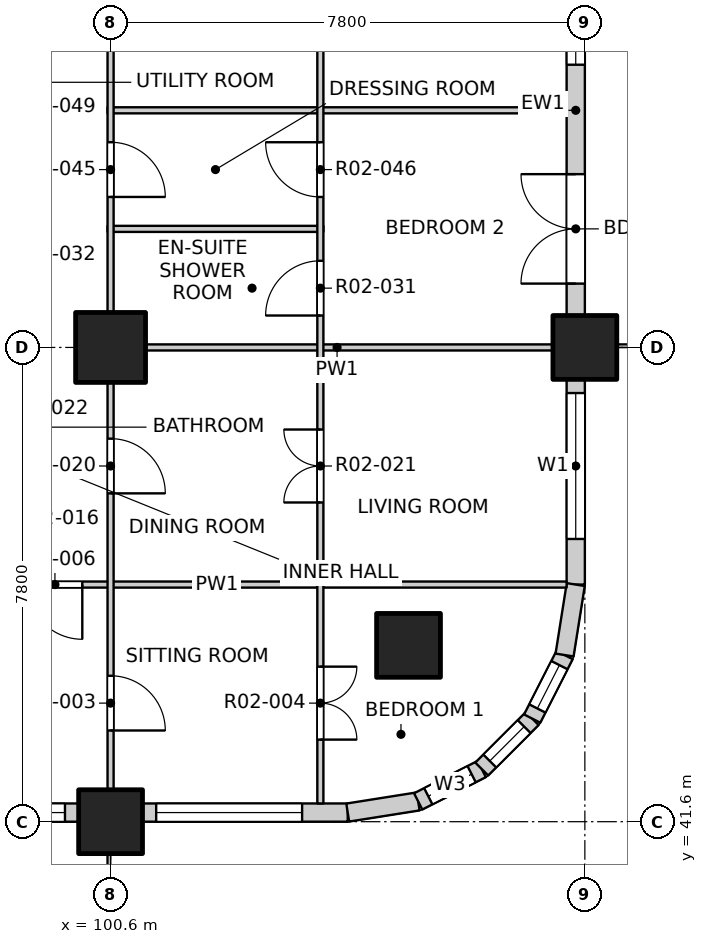
"""IFC4 building model, lengths in metres.
Left out: names, types, materials, properties, quantities, classifications, styles, units other than length and angle.
Written with IfcOpenShell. Run it as: python <this file> out.ifc"""

import sys

from ifc_helpers import new_model, si_unit, direction, frame, frame_2d, origin, origin_2d, place, context, subcontext, project, spatial, rectangle, extrude, element, fill, save


model = new_model("IFC4")
c1 = context("Model", 3, precision=1e-05, world=origin(), true_north=direction((0.0, 1.0)))
c2 = subcontext(c1, "Body", "Model", "MODEL_VIEW")
j1 = project(units=[si_unit("LENGTHUNIT", "METRE"), si_unit("PLANEANGLEUNIT", "RADIAN")], contexts=[c1])
p1 = place(None, origin())
s1 = spatial("IfcSite", under=j1, at=p1, CompositionType="ELEMENT")
p2 = place(p1, origin())
s2 = spatial("IfcBuilding", under=s1, at=p2, CompositionType="ELEMENT")
p3 = place(p2, frame((0.0, 0.0, 29.7)))
s3 = spatial("IfcBuildingStorey", under=s2, at=p3, CompositionType="ELEMENT", Elevation=29.7)
for number, where, z_axis, x_axis in (
    (1, (105.5, 44.5, -0.25), (0.0, 0.0, 1.0), (1.0, 0.0, 0.0)),
    (2, (108.4, 49.4, -0.25), (0.0, 0.0, 1.0), (1.0, 0.0, 0.0)),
    (3, (100.6, 41.6, -0.25), (0.0, 0.0, 1.0), (1.0, 0.0, 0.0)),
):
    element("IfcColumn", number, at=place(p3, frame(where, z_axis=z_axis, x_axis=x_axis)), inside=s3, PredefinedType="COLUMN", context=c2, shape_type="SweptSolid", body=[
        extrude(rectangle(XDim=1.05, YDim=1.05, at=origin_2d()), origin(), (0.0, 0.0, 1.0), 3.4),
    ])
p4 = place(p3, frame((100.6, 49.4, -0.25), z_axis=(0.0, 0.0, 1.0), x_axis=(1.0, 0.0, 0.0)))
e4 = element("IfcColumn", 4, at=p4, inside=s3, PredefinedType="COLUMN", context=c2, shape_type="SweptSolid", body=[
    extrude(rectangle(XDim=1.15, YDim=1.15, at=origin_2d()), origin(), (0.0, 0.0, 1.0), 3.4),
])
p5 = place(p3, frame((93.325, 41.75, 0.0), z_axis=(0.0, 0.0, 1.0), x_axis=(1.0, 0.0, 0.0)))
e5 = element("IfcWall", 5, at=p5, inside=s3, PredefinedType="SOLIDWALL", context=c2, shape_type="SweptSolid", body=[
    extrude(rectangle(XDim=6.75, YDim=0.3, at=frame_2d((3.375, 0.0))), origin(), (0.0, 0.0, 1.0), 2.7),
])
p6 = place(p5, frame((0.525, 0.0, 0.0)))
e6 = element("IfcOpeningElement", 6, at=p6, cuts=e5, PredefinedType="OPENING", context=c2, shape_type="SweptSolid", body=[
    extrude(rectangle(XDim=1.8, YDim=2.4, at=frame_2d((0.9, 1.2))), frame((0.0, 0.16, 0.0), z_axis=(0.0, -1.0, 0.0), x_axis=(1.0, 0.0, 0.0)), (0.0, 0.0, 1.0), 0.32),
])
p7 = place(p5, frame((4.125, 0.0, 0.9)))
e7 = element("IfcOpeningElement", 7, at=p7, cuts=e5, PredefinedType="OPENING", context=c2, shape_type="SweptSolid", body=[
    extrude(rectangle(XDim=2.4, YDim=1.8, at=frame_2d((1.2, 0.9))), frame((0.0, 0.16, 0.0), z_axis=(0.0, -1.0, 0.0), x_axis=(1.0, 0.0, 0.0)), (0.0, 0.0, 1.0), 0.32),
])
p8 = place(p3, frame((101.125, 41.75, 0.0), z_axis=(0.0, 0.0, 1.0), x_axis=(1.0, 0.0, 0.0)))
e8 = element("IfcWall", 8, at=p8, inside=s3, PredefinedType="SOLIDWALL", context=c2, shape_type="SweptSolid", body=[
    extrude(rectangle(XDim=3.375, YDim=0.3, at=frame_2d((1.688, 0.0))), origin(), (0.0, 0.0, 1.0), 2.7),
])
p9 = place(p8, frame((0.225, 0.0, 0.9)))
e9 = element("IfcOpeningElement", 9, at=p9, cuts=e8, PredefinedType="OPENING", context=c2, shape_type="SweptSolid", body=[
    extrude(rectangle(XDim=2.4, YDim=1.8, at=frame_2d((1.2, 0.9))), frame((0.0, 0.16, 0.0), z_axis=(0.0, -1.0, 0.0), x_axis=(1.0, 0.0, 0.0)), (0.0, 0.0, 1.0), 0.32),
])
p10 = place(p3, frame((108.25, 45.5, 0.0), z_axis=(0.0, 0.0, 1.0), x_axis=(0.0, 1.0, 0.0)))
e10 = element("IfcWall", 10, at=p10, inside=s3, PredefinedType="SOLIDWALL", context=c2, shape_type="SweptSolid", body=[
    extrude(rectangle(XDim=3.375, YDim=0.3, at=frame_2d((1.688, 0.0))), origin(), (0.0, 0.0, 1.0), 2.7),
])
p11 = place(p10, frame((0.75, 0.0, 0.9)))
e11 = element("IfcOpeningElement", 11, at=p11, cuts=e10, PredefinedType="OPENING", context=c2, shape_type="SweptSolid", body=[
    extrude(rectangle(XDim=2.4, YDim=1.8, at=frame_2d((1.2, 0.9))), frame((0.0, 0.16, 0.0), z_axis=(0.0, -1.0, 0.0), x_axis=(1.0, 0.0, 0.0)), (0.0, 0.0, 1.0), 0.32),
])
p12 = place(p3, frame((108.25, 49.925, 0.0), z_axis=(0.0, 0.0, 1.0), x_axis=(0.0, 1.0, 0.0)))
e12 = element("IfcWall", 12, at=p12, inside=s3, PredefinedType="SOLIDWALL", context=c2, shape_type="SweptSolid", body=[
    extrude(rectangle(XDim=6.75, YDim=0.3, at=frame_2d((3.375, 0.0))), origin(), (0.0, 0.0, 1.0), 2.7),
])
p13 = place(p12, frame((0.525, 0.0, 0.0)))
e13 = element("IfcOpeningElement", 13, at=p13, cuts=e12, PredefinedType="OPENING", context=c2, shape_type="SweptSolid", body=[
    extrude(rectangle(XDim=1.8, YDim=2.4, at=frame_2d((0.9, 1.2))), frame((0.0, 0.16, 0.0), z_axis=(0.0, -1.0, 0.0), x_axis=(1.0, 0.0, 0.0)), (0.0, 0.0, 1.0), 0.32),
])
p14 = place(p12, frame((4.125, 0.0, 0.9)))
e14 = element("IfcOpeningElement", 14, at=p14, cuts=e12, PredefinedType="OPENING", context=c2, shape_type="SweptSolid", body=[
    extrude(rectangle(XDim=2.4, YDim=1.8, at=frame_2d((1.2, 0.9))), frame((0.0, 0.16, 0.0), z_axis=(0.0, -1.0, 0.0), x_axis=(1.0, 0.0, 0.0)), (0.0, 0.0, 1.0), 0.32),
])
p15 = place(p3, frame((104.5, 41.75, 0.0), z_axis=(0.0, 0.0, 1.0), x_axis=(0.987678452879, 0.156496880861, 0.0)))
e15 = element("IfcWall", 15, at=p15, inside=s3, PredefinedType="SOLIDWALL", context=c2, shape_type="SweptSolid", body=[
    extrude(rectangle(XDim=1.173, YDim=0.3, at=frame_2d((0.586, 0.0))), origin(), (0.0, 0.0, 1.0), 2.7),
])
p16 = place(p3, frame((105.659, 41.934, 0.0), z_axis=(0.0, 0.0, 1.0), x_axis=(0.890988677504, 0.454025524128, 0.0)))
e16 = element("IfcWall", 16, at=p16, inside=s3, PredefinedType="SOLIDWALL", context=c2, shape_type="SweptSolid", body=[
    extrude(rectangle(XDim=1.173, YDim=0.3, at=frame_2d((0.587, 0.0))), origin(), (0.0, 0.0, 1.0), 2.7),
])
p17 = place(p16, frame((0.187, 0.0, 0.9)))
e17 = element("IfcOpeningElement", 17, at=p17, cuts=e16, PredefinedType="OPENING", context=c2, shape_type="SweptSolid", body=[
    extrude(rectangle(XDim=0.8, YDim=1.2, at=frame_2d((0.4, 0.6))), frame((0.0, 0.16, 0.0), z_axis=(0.0, -1.0, 0.0), x_axis=(1.0, 0.0, 0.0)), (0.0, 0.0, 1.0), 0.32),
])
p18 = place(p3, frame((106.704, 42.466, 0.0), z_axis=(0.0, 0.0, 1.0), x_axis=(0.707106781187, 0.707106781187, 0.0)))
e18 = element("IfcWall", 18, at=p18, inside=s3, PredefinedType="SOLIDWALL", context=c2, shape_type="SweptSolid", body=[
    extrude(rectangle(XDim=1.173, YDim=0.3, at=frame_2d((0.586, 0.0))), origin(), (0.0, 0.0, 1.0), 2.7),
])
p19 = place(p18, frame((0.187, 0.0, 0.9)))
e19 = element("IfcOpeningElement", 19, at=p19, cuts=e18, PredefinedType="OPENING", context=c2, shape_type="SweptSolid", body=[
    extrude(rectangle(XDim=0.8, YDim=1.2, at=frame_2d((0.4, 0.6))), frame((0.0, 0.16, 0.0), z_axis=(0.0, -1.0, 0.0), x_axis=(1.0, 0.0, 0.0)), (0.0, 0.0, 1.0), 0.32),
])
p20 = place(p3, frame((107.534, 43.296, 0.0), z_axis=(0.0, 0.0, 1.0), x_axis=(0.454025524128, 0.890988677504, 0.0)))
e20 = element("IfcWall", 20, at=p20, inside=s3, PredefinedType="SOLIDWALL", context=c2, shape_type="SweptSolid", body=[
    extrude(rectangle(XDim=1.173, YDim=0.3, at=frame_2d((0.587, 0.0))), origin(), (0.0, 0.0, 1.0), 2.7),
])
p21 = place(p20, frame((0.187, 0.0, 0.9)))
e21 = element("IfcOpeningElement", 21, at=p21, cuts=e20, PredefinedType="OPENING", context=c2, shape_type="SweptSolid", body=[
    extrude(rectangle(XDim=0.8, YDim=1.2, at=frame_2d((0.4, 0.6))), frame((0.0, 0.16, 0.0), z_axis=(0.0, -1.0, 0.0), x_axis=(1.0, 0.0, 0.0)), (0.0, 0.0, 1.0), 0.32),
])
p22 = place(p3, frame((108.066, 44.341, 0.0), z_axis=(0.0, 0.0, 1.0), x_axis=(0.156496880861, 0.987678452879, 0.0)))
e22 = element("IfcWall", 22, at=p22, inside=s3, PredefinedType="SOLIDWALL", context=c2, shape_type="SweptSolid", body=[
    extrude(rectangle(XDim=1.173, YDim=0.3, at=frame_2d((0.586, 0.0))), origin(), (0.0, 0.0, 1.0), 2.7),
])
p23 = place(p3, frame((96.6, 45.5, 0.0), z_axis=(0.0, 0.0, 1.0), x_axis=(1.0, 0.0, 0.0)))
e23 = element("IfcWall", 23, at=p23, inside=s3, PredefinedType="PARTITIONING", context=c2, shape_type="SweptSolid", body=[
    extrude(rectangle(XDim=11.5, YDim=0.1, at=frame_2d((5.75, 0.0))), origin(), (0.0, 0.0, 1.0), 3.15),
])
p24 = place(p23, frame((2.635, 0.0, 0.0)))
e24 = element("IfcOpeningElement", 24, at=p24, cuts=e23, PredefinedType="OPENING", context=c2, shape_type="SweptSolid", body=[
    extrude(rectangle(XDim=0.9, YDim=2.1, at=frame_2d((0.45, 1.05))), frame((0.0, 0.06, 0.0), z_axis=(0.0, -1.0, 0.0), x_axis=(1.0, 0.0, 0.0)), (0.0, 0.0, 1.0), 0.12),
])
p25 = place(p3, frame((100.55, 49.4, 0.0), z_axis=(0.0, 0.0, 1.0), x_axis=(1.0, 0.0, 0.0)))
e25 = element("IfcWall", 25, at=p25, inside=s3, PredefinedType="PARTITIONING", context=c2, shape_type="SweptSolid", body=[
    extrude(rectangle(XDim=7.55, YDim=0.1, at=frame_2d((3.775, 0.0))), origin(), (0.0, 0.0, 1.0), 2.55),
])
p26 = place(p3, frame((100.55, 51.35, 0.0), z_axis=(0.0, 0.0, 1.0), x_axis=(1.0, 0.0, 0.0)))
e26 = element("IfcWall", 26, at=p26, inside=s3, PredefinedType="PARTITIONING", context=c2, shape_type="SweptSolid", body=[
    extrude(rectangle(XDim=3.55, YDim=0.1, at=frame_2d((1.775, 0.0))), origin(), (0.0, 0.0, 1.0), 3.15),
])
p27 = place(p3, frame((100.55, 53.3, 0.0), z_axis=(0.0, 0.0, 1.0), x_axis=(1.0, 0.0, 0.0)))
e27 = element("IfcWall", 27, at=p27, inside=s3, PredefinedType="PARTITIONING", context=c2, shape_type="SweptSolid", body=[
    extrude(rectangle(XDim=7.55, YDim=0.1, at=frame_2d((3.775, 0.0))), origin(), (0.0, 0.0, 1.0), 3.15),
])
p28 = place(p3, frame((100.6, 41.9, 0.0), z_axis=(0.0, 0.0, 1.0), x_axis=(0.0, 1.0, 0.0)))
e28 = element("IfcWall", 28, at=p28, inside=s3, PredefinedType="PARTITIONING", context=c2, shape_type="SweptSolid", body=[
    extrude(rectangle(XDim=7.5, YDim=0.1, at=frame_2d((3.75, 0.0))), origin(), (0.0, 0.0, 1.0), 2.55),
])
p29 = place(p28, frame((1.2, 0.0, 0.0)))
e29 = element("IfcOpeningElement", 29, at=p29, cuts=e28, PredefinedType="OPENING", context=c2, shape_type="SweptSolid", body=[
    extrude(rectangle(XDim=0.9, YDim=2.1, at=frame_2d((0.45, 1.05))), frame((0.0, 0.06, 0.0), z_axis=(0.0, -1.0, 0.0), x_axis=(1.0, 0.0, 0.0)), (0.0, 0.0, 1.0), 0.12),
])
p30 = place(p28, frame((5.1, 0.0, 0.0)))
e30 = element("IfcOpeningElement", 30, at=p30, cuts=e28, PredefinedType="OPENING", context=c2, shape_type="SweptSolid", body=[
    extrude(rectangle(XDim=0.9, YDim=2.1, at=frame_2d((0.45, 1.05))), frame((0.0, 0.06, 0.0), z_axis=(0.0, -1.0, 0.0), x_axis=(1.0, 0.0, 0.0)), (0.0, 0.0, 1.0), 0.12),
])
p31 = place(p3, frame((100.6, 49.4, 0.0), z_axis=(0.0, 0.0, 1.0), x_axis=(0.0, 1.0, 0.0)))
e31 = element("IfcWall", 31, at=p31, inside=s3, PredefinedType="PARTITIONING", context=c2, shape_type="SweptSolid", body=[
    extrude(rectangle(XDim=31.2, YDim=0.1, at=frame_2d((15.6, 0.0))), origin(), (0.0, 0.0, 1.0), 3.15),
])
p32 = place(p31, frame((2.475, 0.0, 0.0)))
e32 = element("IfcOpeningElement", 32, at=p32, cuts=e31, PredefinedType="OPENING", context=c2, shape_type="SweptSolid", body=[
    extrude(rectangle(XDim=0.9, YDim=2.1, at=frame_2d((0.45, 1.05))), frame((0.0, 0.06, 0.0), z_axis=(0.0, -1.0, 0.0), x_axis=(1.0, 0.0, 0.0)), (0.0, 0.0, 1.0), 0.12),
])
p33 = place(p31, frame((5.4, 0.0, 0.0)))
e33 = element("IfcOpeningElement", 33, at=p33, cuts=e31, PredefinedType="OPENING", context=c2, shape_type="SweptSolid", body=[
    extrude(rectangle(XDim=0.9, YDim=2.1, at=frame_2d((0.45, 1.05))), frame((0.0, 0.06, 0.0), z_axis=(0.0, -1.0, 0.0), x_axis=(1.0, 0.0, 0.0)), (0.0, 0.0, 1.0), 0.12),
])
p34 = place(p31, frame((10.275, 0.0, 0.0)))
e34 = element("IfcOpeningElement", 34, at=p34, cuts=e31, PredefinedType="OPENING", context=c2, shape_type="SweptSolid", body=[
    extrude(rectangle(XDim=0.9, YDim=2.1, at=frame_2d((0.45, 1.05))), frame((0.0, 0.06, 0.0), z_axis=(0.0, -1.0, 0.0), x_axis=(1.0, 0.0, 0.0)), (0.0, 0.0, 1.0), 0.12),
])
p35 = place(p31, frame((14.0, 0.0, 0.0)))
e35 = element("IfcOpeningElement", 35, at=p35, cuts=e31, PredefinedType="OPENING", context=c2, shape_type="SweptSolid", body=[
    extrude(rectangle(XDim=0.9, YDim=2.1, at=frame_2d((0.45, 1.05))), frame((0.0, 0.06, 0.0), z_axis=(0.0, -1.0, 0.0), x_axis=(1.0, 0.0, 0.0)), (0.0, 0.0, 1.0), 0.12),
])
p36 = place(p31, frame((17.1, 0.0, 0.0)))
e36 = element("IfcOpeningElement", 36, at=p36, cuts=e31, PredefinedType="OPENING", context=c2, shape_type="SweptSolid", body=[
    extrude(rectangle(XDim=0.9, YDim=2.1, at=frame_2d((0.45, 1.05))), frame((0.0, 0.06, 0.0), z_axis=(0.0, -1.0, 0.0), x_axis=(1.0, 0.0, 0.0)), (0.0, 0.0, 1.0), 0.12),
])
p37 = place(p31, frame((21.0, 0.0, 0.0)))
e37 = element("IfcOpeningElement", 37, at=p37, cuts=e31, PredefinedType="OPENING", context=c2, shape_type="SweptSolid", body=[
    extrude(rectangle(XDim=0.9, YDim=2.1, at=frame_2d((0.45, 1.05))), frame((0.0, 0.06, 0.0), z_axis=(0.0, -1.0, 0.0), x_axis=(1.0, 0.0, 0.0)), (0.0, 0.0, 1.0), 0.12),
])
p38 = place(p31, frame((25.875, 0.0, 0.0)))
e38 = element("IfcOpeningElement", 38, at=p38, cuts=e31, PredefinedType="OPENING", context=c2, shape_type="SweptSolid", body=[
    extrude(rectangle(XDim=0.9, YDim=2.1, at=frame_2d((0.45, 1.05))), frame((0.0, 0.06, 0.0), z_axis=(0.0, -1.0, 0.0), x_axis=(1.0, 0.0, 0.0)), (0.0, 0.0, 1.0), 0.12),
])
p39 = place(p31, frame((29.6, 0.0, 0.0)))
e39 = element("IfcOpeningElement", 39, at=p39, cuts=e31, PredefinedType="OPENING", context=c2, shape_type="SweptSolid", body=[
    extrude(rectangle(XDim=0.9, YDim=2.1, at=frame_2d((0.45, 1.05))), frame((0.0, 0.06, 0.0), z_axis=(0.0, -1.0, 0.0), x_axis=(1.0, 0.0, 0.0)), (0.0, 0.0, 1.0), 0.12),
])
p40 = place(p3, frame((104.05, 41.9, 0.0), z_axis=(0.0, 0.0, 1.0), x_axis=(0.0, 1.0, 0.0)))
e40 = element("IfcWall", 40, at=p40, inside=s3, PredefinedType="PARTITIONING", context=c2, shape_type="SweptSolid", body=[
    extrude(rectangle(XDim=19.1, YDim=0.1, at=frame_2d((9.55, 0.0))), origin(), (0.0, 0.0, 1.0), 3.15),
])
p41 = place(p40, frame((1.05, 0.0, 0.0)))
e41 = element("IfcOpeningElement", 41, at=p41, cuts=e40, PredefinedType="OPENING", context=c2, shape_type="SweptSolid", body=[
    extrude(rectangle(XDim=1.2, YDim=2.1, at=frame_2d((0.6, 1.05))), frame((0.0, 0.06, 0.0), z_axis=(0.0, -1.0, 0.0), x_axis=(1.0, 0.0, 0.0)), (0.0, 0.0, 1.0), 0.12),
])
p42 = place(p40, frame((4.95, 0.0, 0.0)))
e42 = element("IfcOpeningElement", 42, at=p42, cuts=e40, PredefinedType="OPENING", context=c2, shape_type="SweptSolid", body=[
    extrude(rectangle(XDim=1.2, YDim=2.1, at=frame_2d((0.6, 1.05))), frame((0.0, 0.06, 0.0), z_axis=(0.0, -1.0, 0.0), x_axis=(1.0, 0.0, 0.0)), (0.0, 0.0, 1.0), 0.12),
])
p43 = place(p40, frame((8.025, 0.0, 0.0)))
e43 = element("IfcOpeningElement", 43, at=p43, cuts=e40, PredefinedType="OPENING", context=c2, shape_type="SweptSolid", body=[
    extrude(rectangle(XDim=0.9, YDim=2.1, at=frame_2d((0.45, 1.05))), frame((0.0, 0.06, 0.0), z_axis=(0.0, -1.0, 0.0), x_axis=(1.0, 0.0, 0.0)), (0.0, 0.0, 1.0), 0.12),
])
p44 = place(p40, frame((9.975, 0.0, 0.0)))
e44 = element("IfcOpeningElement", 44, at=p44, cuts=e40, PredefinedType="OPENING", context=c2, shape_type="SweptSolid", body=[
    extrude(rectangle(XDim=0.9, YDim=2.1, at=frame_2d((0.45, 1.05))), frame((0.0, 0.06, 0.0), z_axis=(0.0, -1.0, 0.0), x_axis=(1.0, 0.0, 0.0)), (0.0, 0.0, 1.0), 0.12),
])
p45 = place(p40, frame((12.75, 0.0, 0.0)))
e45 = element("IfcOpeningElement", 45, at=p45, cuts=e40, PredefinedType="OPENING", context=c2, shape_type="SweptSolid", body=[
    extrude(rectangle(XDim=1.2, YDim=2.1, at=frame_2d((0.6, 1.05))), frame((0.0, 0.06, 0.0), z_axis=(0.0, -1.0, 0.0), x_axis=(1.0, 0.0, 0.0)), (0.0, 0.0, 1.0), 0.12),
])
p46 = place(p40, frame((15.825, 0.0, 0.0)))
e46 = element("IfcOpeningElement", 46, at=p46, cuts=e40, PredefinedType="OPENING", context=c2, shape_type="SweptSolid", body=[
    extrude(rectangle(XDim=0.9, YDim=2.1, at=frame_2d((0.45, 1.05))), frame((0.0, 0.06, 0.0), z_axis=(0.0, -1.0, 0.0), x_axis=(1.0, 0.0, 0.0)), (0.0, 0.0, 1.0), 0.12),
])
p47 = place(p40, frame((17.775, 0.0, 0.0)))
e47 = element("IfcOpeningElement", 47, at=p47, cuts=e40, PredefinedType="OPENING", context=c2, shape_type="SweptSolid", body=[
    extrude(rectangle(XDim=0.9, YDim=2.1, at=frame_2d((0.45, 1.05))), frame((0.0, 0.06, 0.0), z_axis=(0.0, -1.0, 0.0), x_axis=(1.0, 0.0, 0.0)), (0.0, 0.0, 1.0), 0.12),
])
p48 = place(p7, origin())
e48 = element("IfcWindow", 48, at=p48, inside=s3, PartitioningType="DOUBLE_PANEL_VERTICAL", PredefinedType="WINDOW", context=c2, shape_type="SweptSolid", body=[
    extrude(rectangle(XDim=2.4, YDim=1.8, at=frame_2d((1.2, 0.9))), frame((0.0, 0.03, 0.0), z_axis=(0.0, -1.0, 0.0), x_axis=(1.0, 0.0, 0.0)), (0.0, 0.0, 1.0), 0.06),
])
fill(e7, e48)
p49 = place(p9, origin())
e49 = element("IfcWindow", 49, at=p49, inside=s3, PartitioningType="DOUBLE_PANEL_VERTICAL", PredefinedType="WINDOW", context=c2, shape_type="SweptSolid", body=[
    extrude(rectangle(XDim=2.4, YDim=1.8, at=frame_2d((1.2, 0.9))), frame((0.0, 0.03, 0.0), z_axis=(0.0, -1.0, 0.0), x_axis=(1.0, 0.0, 0.0)), (0.0, 0.0, 1.0), 0.06),
])
fill(e9, e49)
p50 = place(p11, origin())
e50 = element("IfcWindow", 50, at=p50, inside=s3, PartitioningType="DOUBLE_PANEL_VERTICAL", PredefinedType="WINDOW", context=c2, shape_type="SweptSolid", body=[
    extrude(rectangle(XDim=2.4, YDim=1.8, at=frame_2d((1.2, 0.9))), frame((0.0, 0.03, 0.0), z_axis=(0.0, -1.0, 0.0), x_axis=(1.0, 0.0, 0.0)), (0.0, 0.0, 1.0), 0.06),
])
fill(e11, e50)
p51 = place(p13, origin())
e51 = element("IfcDoor", 51, at=p51, inside=s3, OperationType="DOUBLE_DOOR_SINGLE_SWING", PredefinedType="DOOR", context=c2, shape_type="SweptSolid", body=[
    extrude(rectangle(XDim=1.8, YDim=2.4, at=frame_2d((0.9, 1.2))), frame((0.0, 0.025, 0.0), z_axis=(0.0, -1.0, 0.0), x_axis=(1.0, 0.0, 0.0)), (0.0, 0.0, 1.0), 0.05),
])
fill(e13, e51)
p52 = place(p14, origin())
e52 = element("IfcWindow", 52, at=p52, inside=s3, PartitioningType="DOUBLE_PANEL_VERTICAL", PredefinedType="WINDOW", context=c2, shape_type="SweptSolid", body=[
    extrude(rectangle(XDim=2.4, YDim=1.8, at=frame_2d((1.2, 0.9))), frame((0.0, 0.03, 0.0), z_axis=(0.0, -1.0, 0.0), x_axis=(1.0, 0.0, 0.0)), (0.0, 0.0, 1.0), 0.06),
])
fill(e14, e52)
p53 = place(p17, origin())
e53 = element("IfcWindow", 53, at=p53, inside=s3, PartitioningType="SINGLE_PANEL", PredefinedType="WINDOW", context=c2, shape_type="SweptSolid", body=[
    extrude(rectangle(XDim=0.8, YDim=1.2, at=frame_2d((0.4, 0.6))), frame((0.0, 0.03, 0.0), z_axis=(0.0, -1.0, 0.0), x_axis=(1.0, 0.0, 0.0)), (0.0, 0.0, 1.0), 0.06),
])
fill(e17, e53)
p54 = place(p19, origin())
e54 = element("IfcWindow", 54, at=p54, inside=s3, PartitioningType="SINGLE_PANEL", PredefinedType="WINDOW", context=c2, shape_type="SweptSolid", body=[
    extrude(rectangle(XDim=0.8, YDim=1.2, at=frame_2d((0.4, 0.6))), frame((0.0, 0.03, 0.0), z_axis=(0.0, -1.0, 0.0), x_axis=(1.0, 0.0, 0.0)), (0.0, 0.0, 1.0), 0.06),
])
fill(e19, e54)
p55 = place(p21, origin())
e55 = element("IfcWindow", 55, at=p55, inside=s3, PartitioningType="SINGLE_PANEL", PredefinedType="WINDOW", context=c2, shape_type="SweptSolid", body=[
    extrude(rectangle(XDim=0.8, YDim=1.2, at=frame_2d((0.4, 0.6))), frame((0.0, 0.03, 0.0), z_axis=(0.0, -1.0, 0.0), x_axis=(1.0, 0.0, 0.0)), (0.0, 0.0, 1.0), 0.06),
])
fill(e21, e55)
p56 = place(p29, origin())
e56 = element("IfcDoor", 56, at=p56, inside=s3, OperationType="SINGLE_SWING_RIGHT", PredefinedType="DOOR", context=c2, shape_type="SweptSolid", body=[
    extrude(rectangle(XDim=0.9, YDim=2.1, at=frame_2d((0.45, 1.05))), frame((0.0, 0.025, 0.0), z_axis=(0.0, -1.0, 0.0), x_axis=(1.0, 0.0, 0.0)), (0.0, 0.0, 1.0), 0.05),
])
fill(e29, e56)
p57 = place(p41, origin())
e57 = element("IfcDoor", 57, at=p57, inside=s3, OperationType="DOUBLE_DOOR_SINGLE_SWING", PredefinedType="DOOR", context=c2, shape_type="SweptSolid", body=[
    extrude(rectangle(XDim=1.2, YDim=2.1, at=frame_2d((0.6, 1.05))), frame((0.0, 0.025, 0.0), z_axis=(0.0, -1.0, 0.0), x_axis=(1.0, 0.0, 0.0)), (0.0, 0.0, 1.0), 0.05),
])
fill(e41, e57)
p58 = place(p24, origin())
e58 = element("IfcDoor", 58, at=p58, inside=s3, OperationType="SINGLE_SWING_LEFT", PredefinedType="DOOR", context=c2, shape_type="SweptSolid", body=[
    extrude(rectangle(XDim=0.9, YDim=2.1, at=frame_2d((0.45, 1.05))), frame((0.0, 0.025, 0.0), z_axis=(0.0, -1.0, 0.0), x_axis=(1.0, 0.0, 0.0)), (0.0, 0.0, 1.0), 0.05),
])
fill(e24, e58)
p59 = place(p30, origin())
e59 = element("IfcDoor", 59, at=p59, inside=s3, OperationType="SINGLE_SWING_RIGHT", PredefinedType="DOOR", context=c2, shape_type="SweptSolid", body=[
    extrude(rectangle(XDim=0.9, YDim=2.1, at=frame_2d((0.45, 1.05))), frame((0.0, 0.025, 0.0), z_axis=(0.0, -1.0, 0.0), x_axis=(1.0, 0.0, 0.0)), (0.0, 0.0, 1.0), 0.05),
])
fill(e30, e59)
p60 = place(p42, origin())
e60 = element("IfcDoor", 60, at=p60, inside=s3, OperationType="DOUBLE_DOOR_SINGLE_SWING", PredefinedType="DOOR", context=c2, shape_type="SweptSolid", body=[
    extrude(rectangle(XDim=1.2, YDim=2.1, at=frame_2d((0.6, 1.05))), frame((0.0, 0.025, 0.0), z_axis=(0.0, -1.0, 0.0), x_axis=(1.0, 0.0, 0.0)), (0.0, 0.0, 1.0), 0.05),
])
fill(e42, e60)
p61 = place(p43, origin())
e61 = element("IfcDoor", 61, at=p61, inside=s3, OperationType="SINGLE_SWING_LEFT", PredefinedType="DOOR", context=c2, shape_type="SweptSolid", body=[
    extrude(rectangle(XDim=0.9, YDim=2.1, at=frame_2d((0.45, 1.05))), frame((0.0, 0.025, 0.0), z_axis=(0.0, -1.0, 0.0), x_axis=(1.0, 0.0, 0.0)), (0.0, 0.0, 1.0), 0.05),
])
fill(e43, e61)
p62 = place(p32, origin())
e62 = element("IfcDoor", 62, at=p62, inside=s3, OperationType="SINGLE_SWING_RIGHT", PredefinedType="DOOR", context=c2, shape_type="SweptSolid", body=[
    extrude(rectangle(XDim=0.9, YDim=2.1, at=frame_2d((0.45, 1.05))), frame((0.0, 0.025, 0.0), z_axis=(0.0, -1.0, 0.0), x_axis=(1.0, 0.0, 0.0)), (0.0, 0.0, 1.0), 0.05),
])
fill(e32, e62)
p63 = place(p44, origin())
e63 = element("IfcDoor", 63, at=p63, inside=s3, OperationType="SINGLE_SWING_RIGHT", PredefinedType="DOOR", context=c2, shape_type="SweptSolid", body=[
    extrude(rectangle(XDim=0.9, YDim=2.1, at=frame_2d((0.45, 1.05))), frame((0.0, 0.025, 0.0), z_axis=(0.0, -1.0, 0.0), x_axis=(1.0, 0.0, 0.0)), (0.0, 0.0, 1.0), 0.05),
])
fill(e44, e63)
save(model, sys.argv[1])
